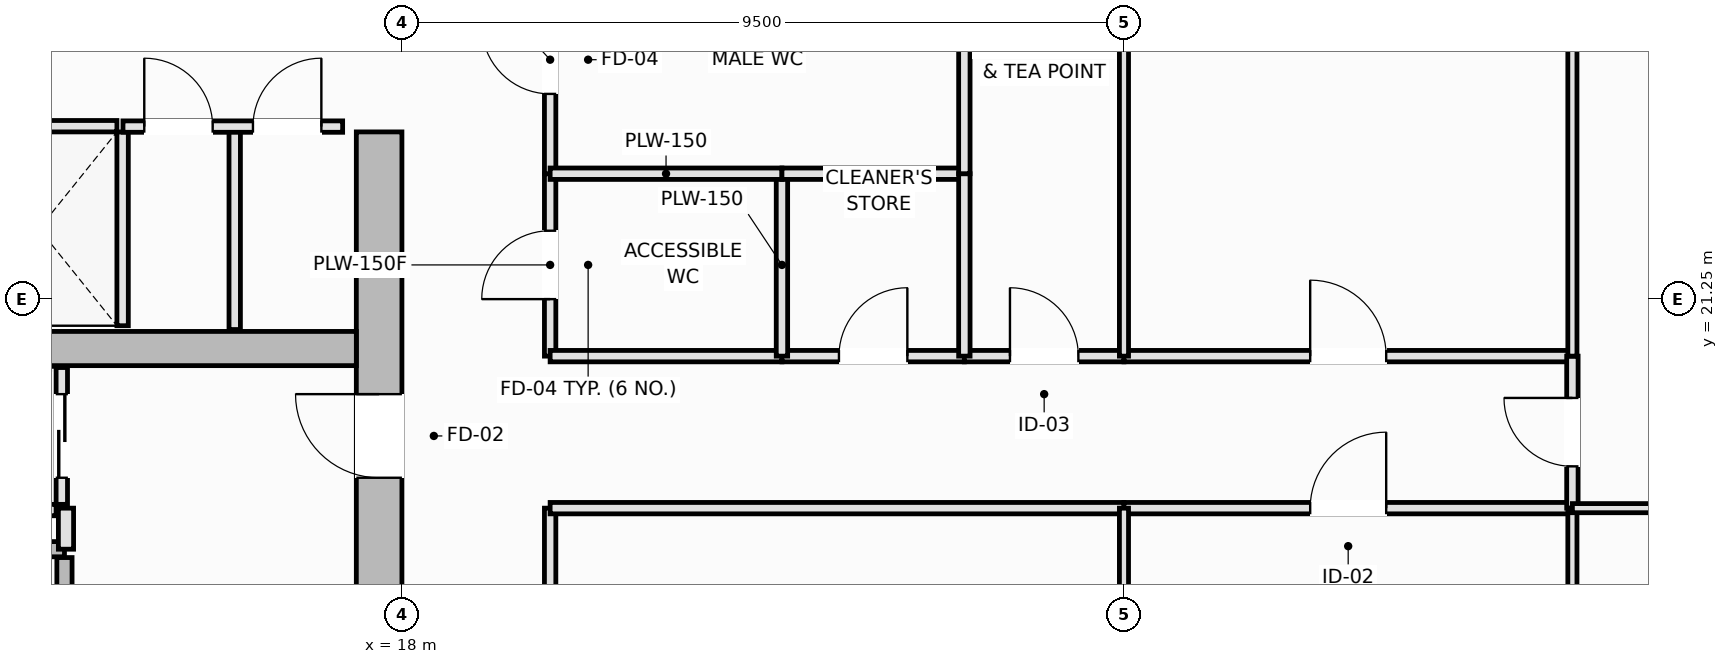
"""IFC4 building model, lengths in metres.
Left out: names, types, materials, properties, quantities, classifications, styles, units other than length and angle.
Written with IfcOpenShell. Run it as: python <this file> out.ifc"""

import sys

from ifc_helpers import new_model, si_unit, direction, frame, frame_2d, origin, place, context, subcontext, project, spatial, rectangle, extrude, element, fill, save


model = new_model("IFC4")
c1 = context("Model", 3, precision=1e-05, world=origin(), true_north=direction((0.0, 1.0)))
c2 = subcontext(c1, "Body", "Model", "MODEL_VIEW")
j1 = project(units=[si_unit("LENGTHUNIT", "METRE"), si_unit("PLANEANGLEUNIT", "RADIAN")], contexts=[c1])
p1 = place(None, origin())
s1 = spatial("IfcSite", under=j1, at=p1, CompositionType="ELEMENT")
p2 = place(p1, origin())
s2 = spatial("IfcBuilding", under=s1, at=p2, CompositionType="ELEMENT")
p3 = place(p2, frame((0.0, 0.0, 137.75)))
s3 = spatial("IfcBuildingStorey", under=s2, at=p3, CompositionType="ELEMENT", Elevation=137.75)
p4 = place(p3, frame((17.7, 14.6, 0.0), z_axis=(0.0, 0.0, 1.0), x_axis=(0.0, 1.0, 0.0)))
e1 = element("IfcWall", 1, at=p4, inside=s3, PredefinedType="SHEAR", context=c2, shape_type="SweptSolid", body=[
    extrude(rectangle(XDim=8.85, YDim=0.6, at=frame_2d((4.425, 0.0))), origin(), (0.0, 0.0, 1.0), 3.55),
])
p5 = place(p4, frame((4.3, 0.0, 0.0)))
e2 = element("IfcOpeningElement", 2, at=p5, cuts=e1, PredefinedType="OPENING", context=c2, shape_type="SweptSolid", body=[
    extrude(rectangle(XDim=1.1, YDim=2.15, at=frame_2d((0.55, 1.075))), frame((0.0, 0.31, 0.0), z_axis=(0.0, -1.0, 0.0), x_axis=(1.0, 0.0, 0.0)), (0.0, 0.0, 1.0), 0.62),
])
p6 = place(p3, frame((5.1, 20.6, 0.0), z_axis=(0.0, 0.0, 1.0), x_axis=(1.0, 0.0, 0.0)))
e3 = element("IfcWall", 3, at=p6, inside=s3, PredefinedType="SHEAR", context=c2, shape_type="SweptSolid", body=[
    extrude(rectangle(XDim=12.3, YDim=0.45, at=frame_2d((6.15, 0.0))), origin(), (0.0, 0.0, 1.0), 3.55),
])
p7 = place(p3, frame((5.9, 17.96, 0.0), z_axis=(0.0, 0.0, 1.0), x_axis=(1.0, 0.0, 0.0)))
e4 = element("IfcWall", 4, at=p7, inside=s3, PredefinedType="SOLIDWALL", context=c2, shape_type="SweptSolid", body=[
    extrude(rectangle(XDim=7.66, YDim=0.2, at=frame_2d((3.83, 0.0))), origin(), (0.0, 0.0, 1.0), 3.55),
])
p8 = place(p3, frame((13.56, 14.8, 0.0), z_axis=(0.0, 0.0, 1.0), x_axis=(0.0, 1.0, 0.0)))
e5 = element("IfcWall", 5, at=p8, inside=s3, PredefinedType="SOLIDWALL", context=c2, shape_type="SweptSolid", body=[
    extrude(rectangle(XDim=3.05, YDim=0.2, at=frame_2d((1.525, 0.0))), origin(), (0.0, 0.0, 1.0), 3.55),
])
p9 = place(p8, frame((0.95, 0.0, 0.0)))
e6 = element("IfcOpeningElement", 6, at=p9, cuts=e5, PredefinedType="OPENING", context=c2, shape_type="SweptSolid", body=[
    extrude(rectangle(XDim=1.15, YDim=2.15, at=frame_2d((0.575, 1.075))), frame((0.0, 0.11, 0.0), z_axis=(0.0, -1.0, 0.0), x_axis=(1.0, 0.0, 0.0)), (0.0, 0.0, 1.0), 0.22),
])
p10 = place(p3, frame((12.2, 23.525, 0.0), z_axis=(0.0, 0.0, 1.0), x_axis=(1.0, 0.0, 0.0)))
e7 = element("IfcWall", 7, at=p10, inside=s3, PredefinedType="PARTITIONING", context=c2, shape_type="SweptSolid", body=[
    extrude(rectangle(XDim=2.05, YDim=0.15, at=frame_2d((1.025, 0.0))), origin(), (0.0, 0.0, 1.0), 3.37),
])
p11 = place(p3, frame((14.325, 20.9, 0.0), z_axis=(0.0, 0.0, 1.0), x_axis=(0.0, 1.0, 0.0)))
e8 = element("IfcWall", 8, at=p11, inside=s3, PredefinedType="PARTITIONING", context=c2, shape_type="SweptSolid", body=[
    extrude(rectangle(XDim=2.55, YDim=0.15, at=frame_2d((1.275, 0.0))), origin(), (0.0, 0.0, 1.0), 3.37),
])
p12 = place(p3, frame((10.95, 18.475, 0.0), z_axis=(0.0, 0.0, 1.0), x_axis=(1.0, 0.0, 0.0)))
e9 = element("IfcWall", 9, at=p12, inside=s3, PredefinedType="PARTITIONING", context=c2, shape_type="SweptSolid", body=[
    extrude(rectangle(XDim=2.5, YDim=0.15, at=frame_2d((1.25, 0.0))), origin(), (0.0, 0.0, 1.0), 3.37),
])
p13 = place(p3, frame((13.525, 18.55, 0.0), z_axis=(0.0, 0.0, 1.0), x_axis=(0.0, 1.0, 0.0)))
e10 = element("IfcWall", 10, at=p13, inside=s3, PredefinedType="PARTITIONING", context=c2, shape_type="SweptSolid", body=[
    extrude(rectangle(XDim=1.8, YDim=0.15, at=frame_2d((0.9, 0.0))), origin(), (0.0, 0.0, 1.0), 3.37),
])
p14 = place(p13, frame((0.35, 0.0, 0.0)))
e11 = element("IfcOpeningElement", 11, at=p14, cuts=e10, PredefinedType="OPENING", context=c2, shape_type="SweptSolid", body=[
    extrude(rectangle(XDim=1.1, YDim=2.2, at=frame_2d((0.55, 1.1))), frame((0.0, 0.085, 0.0), z_axis=(0.0, -1.0, 0.0), x_axis=(1.0, 0.0, 0.0)), (0.0, 0.0, 1.0), 0.17),
])
p15 = place(p3, frame((13.58, 17.96, 0.0), z_axis=(0.0, 0.0, 1.0), x_axis=(0.0, 1.0, 0.0)))
e12 = element("IfcWall", 12, at=p15, inside=s3, PredefinedType="PARTITIONING", context=c2, shape_type="SweptSolid", body=[
    extrude(rectangle(XDim=0.54, YDim=0.2, at=frame_2d((0.27, 0.0))), origin(), (0.0, 0.0, 1.0), 3.37),
])
p16 = place(p3, frame((15.8, 20.85, 0.0), z_axis=(0.0, 0.0, 1.0), x_axis=(0.0, 1.0, 0.0)))
e13 = element("IfcWall", 13, at=p16, inside=s3, PredefinedType="PARTITIONING", context=c2, shape_type="SweptSolid", body=[
    extrude(rectangle(XDim=2.67, YDim=0.15, at=frame_2d((1.335, 0.0))), origin(), (0.0, 0.0, 1.0), 3.37),
])
p17 = place(p3, frame((14.33, 23.52, 0.0), z_axis=(0.0, 0.0, 1.0), x_axis=(1.0, 0.0, 0.0)))
e14 = element("IfcWall", 14, at=p17, inside=s3, PredefinedType="PARTITIONING", context=c2, shape_type="SweptSolid", body=[
    extrude(rectangle(XDim=2.89, YDim=0.15, at=frame_2d((1.445, 0.0))), origin(), (0.0, 0.0, 1.0), 3.37),
])
p18 = place(p17, frame((0.28, 0.0, 0.0)))
e15 = element("IfcOpeningElement", 15, at=p18, cuts=e14, PredefinedType="OPENING", context=c2, shape_type="SweptSolid", body=[
    extrude(rectangle(XDim=0.9, YDim=2.1, at=frame_2d((0.45, 1.05))), frame((0.0, 0.085, 0.0), z_axis=(0.0, -1.0, 0.0), x_axis=(1.0, 0.0, 0.0)), (0.0, 0.0, 1.0), 0.17),
])
p19 = place(p17, frame((1.71, 0.0, 0.0)))
e16 = element("IfcOpeningElement", 16, at=p19, cuts=e14, PredefinedType="OPENING", context=c2, shape_type="SweptSolid", body=[
    extrude(rectangle(XDim=0.9, YDim=2.1, at=frame_2d((0.45, 1.05))), frame((0.0, 0.085, 0.0), z_axis=(0.0, -1.0, 0.0), x_axis=(1.0, 0.0, 0.0)), (0.0, 0.0, 1.0), 0.17),
])
p20 = place(p3, frame((19.95, 20.5, 0.0), z_axis=(0.0, 0.0, 1.0), x_axis=(0.0, 1.0, 0.0)))
e17 = element("IfcWall", 17, at=p20, inside=s3, PredefinedType="PLUMBINGWALL", context=c2, shape_type="SweptSolid", body=[
    extrude(rectangle(XDim=2.4, YDim=0.15, at=frame_2d((1.2, 0.0))), origin(), (0.0, 0.0, 1.0), 3.37),
])
p21 = place(p20, frame((0.75, 0.0, 0.0)))
e18 = element("IfcOpeningElement", 18, at=p21, cuts=e17, PredefinedType="OPENING", context=c2, shape_type="SweptSolid", body=[
    extrude(rectangle(XDim=0.9, YDim=2.1, at=frame_2d((0.45, 1.05))), frame((0.0, 0.085, 0.0), z_axis=(0.0, -1.0, 0.0), x_axis=(1.0, 0.0, 0.0)), (0.0, 0.0, 1.0), 0.17),
])
p22 = place(p3, frame((19.95, 22.9, 0.0), z_axis=(0.0, 0.0, 1.0), x_axis=(0.0, 1.0, 0.0)))
e19 = element("IfcWall", 19, at=p22, inside=s3, PredefinedType="PLUMBINGWALL", context=c2, shape_type="SweptSolid", body=[
    extrude(rectangle(XDim=3.0, YDim=0.15, at=frame_2d((1.5, 0.0))), origin(), (0.0, 0.0, 1.0), 3.37),
])
p23 = place(p22, frame((1.05, 0.0, 0.0)))
e20 = element("IfcOpeningElement", 20, at=p23, cuts=e19, PredefinedType="OPENING", context=c2, shape_type="SweptSolid", body=[
    extrude(rectangle(XDim=0.9, YDim=2.1, at=frame_2d((0.45, 1.05))), frame((0.0, 0.085, 0.0), z_axis=(0.0, -1.0, 0.0), x_axis=(1.0, 0.0, 0.0)), (0.0, 0.0, 1.0), 0.17),
])
p24 = place(p3, frame((19.95, 14.0, 0.0), z_axis=(0.0, 0.0, 1.0), x_axis=(0.0, 1.0, 0.0)))
e21 = element("IfcWall", 21, at=p24, inside=s3, PredefinedType="PARTITIONING", context=c2, shape_type="SweptSolid", body=[
    extrude(rectangle(XDim=4.5, YDim=0.15, at=frame_2d((2.25, 0.0))), origin(), (0.0, 0.0, 1.0), 3.37),
])
p25 = place(p24, frame((1.75, 0.0, 0.0)))
e22 = element("IfcOpeningElement", 22, at=p25, cuts=e21, PredefinedType="OPENING", context=c2, shape_type="SweptSolid", body=[
    extrude(rectangle(XDim=1.0, YDim=2.15, at=frame_2d((0.5, 1.075))), frame((0.0, 0.085, 0.0), z_axis=(0.0, -1.0, 0.0), x_axis=(1.0, 0.0, 0.0)), (0.0, 0.0, 1.0), 0.17),
])
p26 = place(p3, frame((19.95, 20.5, 0.0), z_axis=(0.0, 0.0, 1.0), x_axis=(1.0, 0.0, 0.0)))
e23 = element("IfcWall", 23, at=p26, inside=s3, PredefinedType="PLUMBINGWALL", context=c2, shape_type="SweptSolid", body=[
    extrude(rectangle(XDim=3.05, YDim=0.15, at=frame_2d((1.525, 0.0))), origin(), (0.0, 0.0, 1.0), 3.37),
])
p27 = place(p3, frame((23.0, 20.5, 0.0), z_axis=(0.0, 0.0, 1.0), x_axis=(1.0, 0.0, 0.0)))
e24 = element("IfcWall", 24, at=p27, inside=s3, PredefinedType="PLUMBINGWALL", context=c2, shape_type="SweptSolid", body=[
    extrude(rectangle(XDim=2.4, YDim=0.15, at=frame_2d((1.2, 0.0))), origin(), (0.0, 0.0, 1.0), 3.37),
])
p28 = place(p27, frame((0.75, 0.0, 0.0)))
e25 = element("IfcOpeningElement", 25, at=p28, cuts=e24, PredefinedType="OPENING", context=c2, shape_type="SweptSolid", body=[
    extrude(rectangle(XDim=0.9, YDim=2.1, at=frame_2d((0.45, 1.05))), frame((0.0, 0.085, 0.0), z_axis=(0.0, -1.0, 0.0), x_axis=(1.0, 0.0, 0.0)), (0.0, 0.0, 1.0), 0.17),
])
p29 = place(p3, frame((25.4, 20.5, 0.0), z_axis=(0.0, 0.0, 1.0), x_axis=(1.0, 0.0, 0.0)))
e26 = element("IfcWall", 26, at=p29, inside=s3, PredefinedType="PARTITIONING", context=c2, shape_type="SweptSolid", body=[
    extrude(rectangle(XDim=2.1, YDim=0.15, at=frame_2d((1.05, 0.0))), origin(), (0.0, 0.0, 1.0), 3.37),
])
p30 = place(p29, frame((0.6, 0.0, 0.0)))
e27 = element("IfcOpeningElement", 27, at=p30, cuts=e26, PredefinedType="OPENING", context=c2, shape_type="SweptSolid", body=[
    extrude(rectangle(XDim=0.9, YDim=2.1, at=frame_2d((0.45, 1.05))), frame((0.0, 0.085, 0.0), z_axis=(0.0, -1.0, 0.0), x_axis=(1.0, 0.0, 0.0)), (0.0, 0.0, 1.0), 0.17),
])
p31 = place(p3, frame((19.95, 18.5, 0.0), z_axis=(0.0, 0.0, 1.0), x_axis=(1.0, 0.0, 0.0)))
e28 = element("IfcWall", 28, at=p31, inside=s3, PredefinedType="PARTITIONING", context=c2, shape_type="SweptSolid", body=[
    extrude(rectangle(XDim=7.55, YDim=0.15, at=frame_2d((3.775, 0.0))), origin(), (0.0, 0.0, 1.0), 2.77),
])
p32 = place(p3, frame((27.5, 18.5, 0.0), z_axis=(0.0, 0.0, 1.0), x_axis=(1.0, 0.0, 0.0)))
e29 = element("IfcWall", 29, at=p32, inside=s3, PredefinedType="PARTITIONING", context=c2, shape_type="SweptSolid", body=[
    extrude(rectangle(XDim=5.9, YDim=0.15, at=frame_2d((2.95, 0.0))), origin(), (0.0, 0.0, 1.0), 2.77),
])
p33 = place(p32, frame((2.45, 0.0, 0.0)))
e30 = element("IfcOpeningElement", 30, at=p33, cuts=e29, PredefinedType="OPENING", context=c2, shape_type="SweptSolid", body=[
    extrude(rectangle(XDim=1.0, YDim=2.15, at=frame_2d((0.5, 1.075))), frame((0.0, 0.085, 0.0), z_axis=(0.0, -1.0, 0.0), x_axis=(1.0, 0.0, 0.0)), (0.0, 0.0, 1.0), 0.17),
])
p34 = place(p3, frame((27.5, 20.5, 0.0), z_axis=(0.0, 0.0, 1.0), x_axis=(1.0, 0.0, 0.0)))
e31 = element("IfcWall", 31, at=p34, inside=s3, PredefinedType="PARTITIONING", context=c2, shape_type="SweptSolid", body=[
    extrude(rectangle(XDim=5.9, YDim=0.15, at=frame_2d((2.95, 0.0))), origin(), (0.0, 0.0, 1.0), 3.37),
])
p35 = place(p34, frame((2.45, 0.0, 0.0)))
e32 = element("IfcOpeningElement", 32, at=p35, cuts=e31, PredefinedType="OPENING", context=c2, shape_type="SweptSolid", body=[
    extrude(rectangle(XDim=1.0, YDim=2.15, at=frame_2d((0.5, 1.075))), frame((0.0, 0.085, 0.0), z_axis=(0.0, -1.0, 0.0), x_axis=(1.0, 0.0, 0.0)), (0.0, 0.0, 1.0), 0.17),
])
p36 = place(p3, frame((33.4, 18.5, 0.0), z_axis=(0.0, 0.0, 1.0), x_axis=(0.0, 1.0, 0.0)))
e33 = element("IfcWall", 33, at=p36, inside=s3, PredefinedType="PARTITIONING", context=c2, shape_type="SweptSolid", body=[
    extrude(rectangle(XDim=2.0, YDim=0.15, at=frame_2d((1.0, 0.0))), origin(), (0.0, 0.0, 1.0), 3.37),
])
p37 = place(p36, frame((0.55, 0.0, 0.0)))
e34 = element("IfcOpeningElement", 34, at=p37, cuts=e33, PredefinedType="OPENING", context=c2, shape_type="SweptSolid", body=[
    extrude(rectangle(XDim=0.9, YDim=2.1, at=frame_2d((0.45, 1.05))), frame((0.0, 0.085, 0.0), z_axis=(0.0, -1.0, 0.0), x_axis=(1.0, 0.0, 0.0)), (0.0, 0.0, 1.0), 0.17),
])
p38 = place(p3, frame((23.0, 20.5, 0.0), z_axis=(0.0, 0.0, 1.0), x_axis=(0.0, 1.0, 0.0)))
e35 = element("IfcWall", 35, at=p38, inside=s3, PredefinedType="PLUMBINGWALL", context=c2, shape_type="SweptSolid", body=[
    extrude(rectangle(XDim=2.4, YDim=0.15, at=frame_2d((1.2, 0.0))), origin(), (0.0, 0.0, 1.0), 3.37),
])
p39 = place(p3, frame((19.95, 22.9, 0.0), z_axis=(0.0, 0.0, 1.0), x_axis=(1.0, 0.0, 0.0)))
e36 = element("IfcWall", 36, at=p39, inside=s3, PredefinedType="PLUMBINGWALL", context=c2, shape_type="SweptSolid", body=[
    extrude(rectangle(XDim=3.05, YDim=0.15, at=frame_2d((1.525, 0.0))), origin(), (0.0, 0.0, 1.0), 3.37),
])
for number, where, z_axis, x_axis in (
    (37, (23.0, 22.9, 0.0), (0.0, 0.0, 1.0), (1.0, 0.0, 0.0)),
    (38, (25.4, 20.5, 0.0), (0.0, 0.0, 1.0), (0.0, 1.0, 0.0)),
):
    element("IfcWall", number, at=place(p3, frame(where, z_axis=z_axis, x_axis=x_axis)), inside=s3, PredefinedType="PLUMBINGWALL", context=c2, shape_type="SweptSolid", body=[
        extrude(rectangle(XDim=2.4, YDim=0.15, at=frame_2d((1.2, 0.0))), origin(), (0.0, 0.0, 1.0), 3.37),
    ])
p40 = place(p3, frame((25.4, 22.9, 0.0), z_axis=(0.0, 0.0, 1.0), x_axis=(0.0, 1.0, 0.0)))
e39 = element("IfcWall", 39, at=p40, inside=s3, PredefinedType="PLUMBINGWALL", context=c2, shape_type="SweptSolid", body=[
    extrude(rectangle(XDim=3.0, YDim=0.15, at=frame_2d((1.5, 0.0))), origin(), (0.0, 0.0, 1.0), 3.37),
])
p41 = place(p3, frame((27.5, 20.5, 0.0), z_axis=(0.0, 0.0, 1.0), x_axis=(0.0, 1.0, 0.0)))
e40 = element("IfcWall", 40, at=p41, inside=s3, PredefinedType="PARTITIONING", context=c2, shape_type="SweptSolid", body=[
    extrude(rectangle(XDim=8.4, YDim=0.12, at=frame_2d((4.2, 0.0))), origin(), (0.0, 0.0, 1.0), 3.37),
])
p42 = place(p3, frame((27.5, 14.0, 0.0), z_axis=(0.0, 0.0, 1.0), x_axis=(0.0, 1.0, 0.0)))
e41 = element("IfcWall", 41, at=p42, inside=s3, PredefinedType="PARTITIONING", context=c2, shape_type="SweptSolid", body=[
    extrude(rectangle(XDim=4.5, YDim=0.12, at=frame_2d((2.25, 0.0))), origin(), (0.0, 0.0, 1.0), 3.37),
])
p43 = place(p3, frame((33.4, 3.51, 0.0), z_axis=(0.0, 0.0, 1.0), x_axis=(0.0, 1.0, 0.0)))
e42 = element("IfcWall", 42, at=p43, inside=s3, PredefinedType="PARTITIONING", context=c2, shape_type="SweptSolid", body=[
    extrude(rectangle(XDim=14.99, YDim=0.12, at=frame_2d((7.495, 0.0))), origin(), (0.0, 0.0, 1.0), 3.37),
])
p44 = place(p3, frame((33.4, 20.5, 0.0), z_axis=(0.0, 0.0, 1.0), x_axis=(0.0, 1.0, 0.0)))
e43 = element("IfcWall", 43, at=p44, inside=s3, PredefinedType="PARTITIONING", context=c2, shape_type="SweptSolid", body=[
    extrude(rectangle(XDim=25.99, YDim=0.12, at=frame_2d((12.995, 0.0))), origin(), (0.0, 0.0, 1.0), 3.37),
])
p45 = place(p3, frame((33.4, 18.5, 0.0), z_axis=(0.0, 0.0, 1.0), x_axis=(1.0, 0.0, 0.0)))
e44 = element("IfcWall", 44, at=p45, inside=s3, PredefinedType="PARTITIONING", context=c2, shape_type="SweptSolid", body=[
    extrude(rectangle(XDim=17.09, YDim=0.12, at=frame_2d((8.545, 0.0))), origin(), (0.0, 0.0, 1.0), 2.77),
])
p46 = place(p45, frame((8.045, 0.0, 0.0)))
e45 = element("IfcOpeningElement", 45, at=p46, cuts=e44, PredefinedType="OPENING", context=c2, shape_type="SweptSolid", body=[
    extrude(rectangle(XDim=1.0, YDim=2.15, at=frame_2d((0.5, 1.075))), frame((0.0, 0.07, 0.0), z_axis=(0.0, -1.0, 0.0), x_axis=(1.0, 0.0, 0.0)), (0.0, 0.0, 1.0), 0.14),
])
p47 = place(p14, origin())
e46 = element("IfcDoor", 46, at=p47, inside=s3, OperationType="DOUBLE_DOOR_SLIDING", PredefinedType="DOOR", context=c2, shape_type="SweptSolid", body=[
    extrude(rectangle(XDim=1.1, YDim=2.2, at=frame_2d((0.55, 1.1))), frame((0.0, 0.025, 0.0), z_axis=(0.0, -1.0, 0.0), x_axis=(1.0, 0.0, 0.0)), (0.0, 0.0, 1.0), 0.05),
])
fill(e11, e46)
p48 = place(p5, origin())
e47 = element("IfcDoor", 47, at=p48, inside=s3, OperationType="SINGLE_SWING_RIGHT", PredefinedType="DOOR", context=c2, shape_type="SweptSolid", body=[
    extrude(rectangle(XDim=1.1, YDim=2.15, at=frame_2d((0.55, 1.075))), frame((0.0, 0.025, 0.0), z_axis=(0.0, -1.0, 0.0), x_axis=(1.0, 0.0, 0.0)), (0.0, 0.0, 1.0), 0.05),
])
fill(e2, e47)
p49 = place(p18, origin())
e48 = element("IfcDoor", 48, at=p49, inside=s3, OperationType="SINGLE_SWING_LEFT", PredefinedType="DOOR", context=c2, shape_type="SweptSolid", body=[
    extrude(rectangle(XDim=0.9, YDim=2.1, at=frame_2d((0.45, 1.05))), frame((0.0, 0.025, 0.0), z_axis=(0.0, -1.0, 0.0), x_axis=(1.0, 0.0, 0.0)), (0.0, 0.0, 1.0), 0.05),
])
fill(e15, e48)
p50 = place(p19, origin())
e49 = element("IfcDoor", 49, at=p50, inside=s3, OperationType="SINGLE_SWING_RIGHT", PredefinedType="DOOR", context=c2, shape_type="SweptSolid", body=[
    extrude(rectangle(XDim=0.9, YDim=2.1, at=frame_2d((0.45, 1.05))), frame((0.0, 0.025, 0.0), z_axis=(0.0, -1.0, 0.0), x_axis=(1.0, 0.0, 0.0)), (0.0, 0.0, 1.0), 0.05),
])
fill(e16, e49)
p51 = place(p21, origin())
e50 = element("IfcDoor", 50, at=p51, inside=s3, OperationType="SINGLE_SWING_LEFT", PredefinedType="DOOR", context=c2, shape_type="SweptSolid", body=[
    extrude(rectangle(XDim=0.9, YDim=2.1, at=frame_2d((0.45, 1.05))), frame((0.0, 0.025, 0.0), z_axis=(0.0, -1.0, 0.0), x_axis=(1.0, 0.0, 0.0)), (0.0, 0.0, 1.0), 0.05),
])
fill(e18, e50)
p52 = place(p23, origin())
e51 = element("IfcDoor", 51, at=p52, inside=s3, OperationType="SINGLE_SWING_RIGHT", PredefinedType="DOOR", context=c2, shape_type="SweptSolid", body=[
    extrude(rectangle(XDim=0.9, YDim=2.1, at=frame_2d((0.45, 1.05))), frame((0.0, 0.025, 0.0), z_axis=(0.0, -1.0, 0.0), x_axis=(1.0, 0.0, 0.0)), (0.0, 0.0, 1.0), 0.05),
])
fill(e20, e51)
p53 = place(p28, origin())
e52 = element("IfcDoor", 52, at=p53, inside=s3, OperationType="SINGLE_SWING_RIGHT", PredefinedType="DOOR", context=c2, shape_type="SweptSolid", body=[
    extrude(rectangle(XDim=0.9, YDim=2.1, at=frame_2d((0.45, 1.05))), frame((0.0, 0.025, 0.0), z_axis=(0.0, -1.0, 0.0), x_axis=(1.0, 0.0, 0.0)), (0.0, 0.0, 1.0), 0.05),
])
fill(e25, e52)
p54 = place(p30, origin())
e53 = element("IfcDoor", 53, at=p54, inside=s3, OperationType="SINGLE_SWING_LEFT", PredefinedType="DOOR", context=c2, shape_type="SweptSolid", body=[
    extrude(rectangle(XDim=0.9, YDim=2.1, at=frame_2d((0.45, 1.05))), frame((0.0, 0.025, 0.0), z_axis=(0.0, -1.0, 0.0), x_axis=(1.0, 0.0, 0.0)), (0.0, 0.0, 1.0), 0.05),
])
fill(e27, e53)
p55 = place(p33, origin())
e54 = element("IfcDoor", 54, at=p55, inside=s3, OperationType="SINGLE_SWING_RIGHT", PredefinedType="DOOR", context=c2, shape_type="SweptSolid", body=[
    extrude(rectangle(XDim=1.0, YDim=2.15, at=frame_2d((0.5, 1.075))), frame((0.0, 0.025, 0.0), z_axis=(0.0, -1.0, 0.0), x_axis=(1.0, 0.0, 0.0)), (0.0, 0.0, 1.0), 0.05),
])
fill(e30, e54)
p56 = place(p35, origin())
e55 = element("IfcDoor", 55, at=p56, inside=s3, OperationType="SINGLE_SWING_LEFT", PredefinedType="DOOR", context=c2, shape_type="SweptSolid", body=[
    extrude(rectangle(XDim=1.0, YDim=2.15, at=frame_2d((0.5, 1.075))), frame((0.0, 0.025, 0.0), z_axis=(0.0, -1.0, 0.0), x_axis=(1.0, 0.0, 0.0)), (0.0, 0.0, 1.0), 0.05),
])
fill(e32, e55)
p57 = place(p37, origin())
e56 = element("IfcDoor", 56, at=p57, inside=s3, OperationType="SINGLE_SWING_RIGHT", PredefinedType="DOOR", context=c2, shape_type="SweptSolid", body=[
    extrude(rectangle(XDim=0.9, YDim=2.1, at=frame_2d((0.45, 1.05))), frame((0.0, 0.025, 0.0), z_axis=(0.0, -1.0, 0.0), x_axis=(1.0, 0.0, 0.0)), (0.0, 0.0, 1.0), 0.05),
])
fill(e34, e56)
save(model, sys.argv[1])
